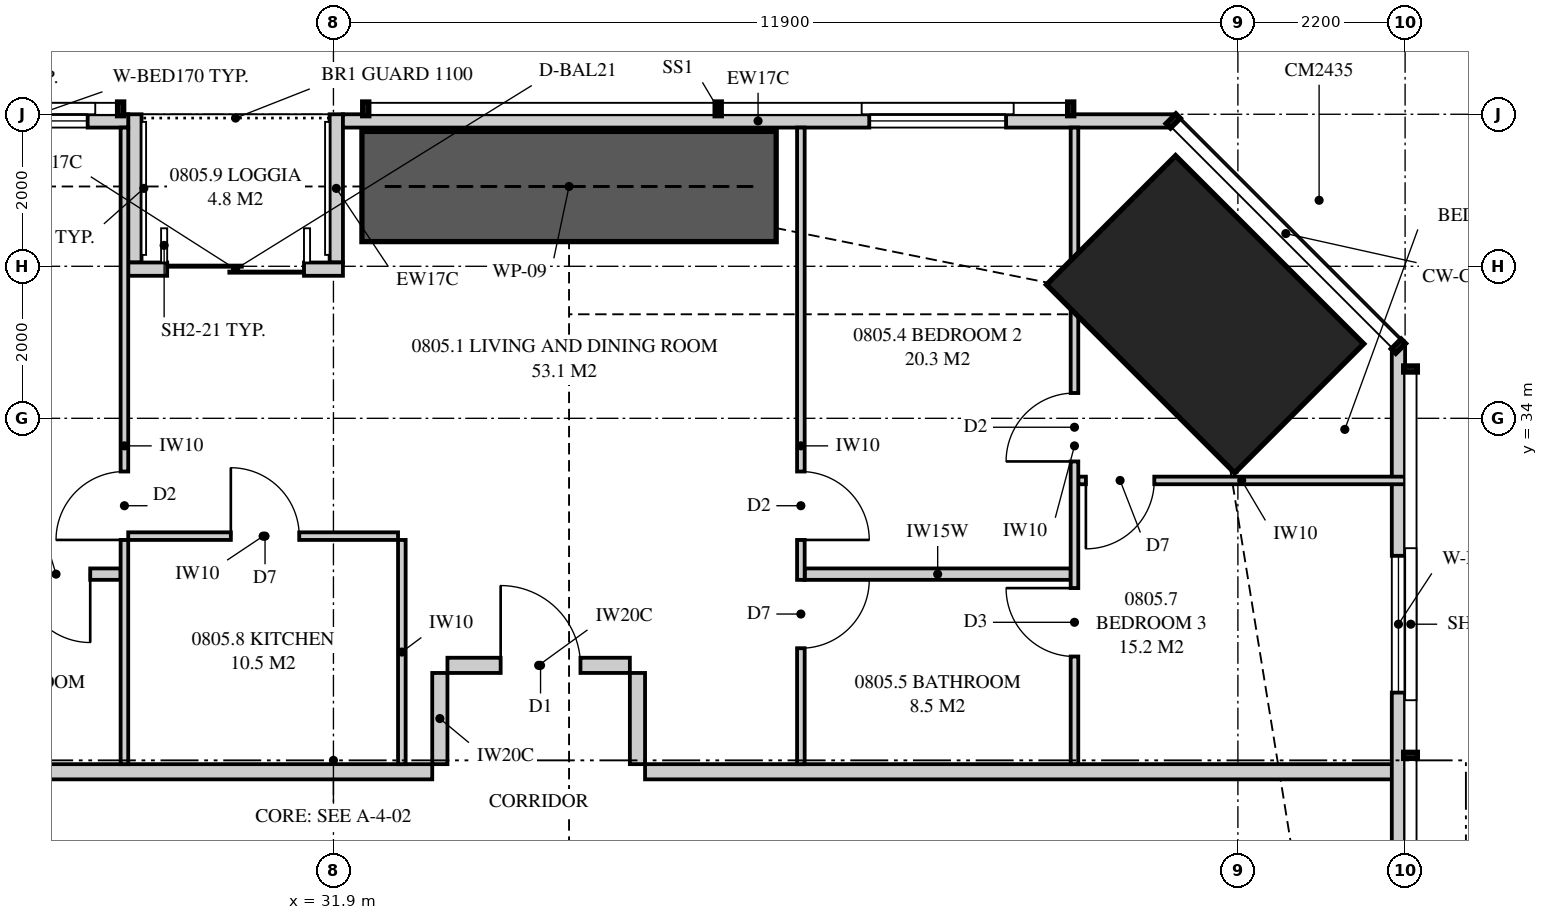
"""IFC4 building model, lengths in metres.
Left out: names, types, materials, properties, quantities, classifications, styles, units other than length and angle.
Written with IfcOpenShell. Run it as: python <this file> out.ifc"""

import sys

from ifc_helpers import new_model, si_unit, direction, frame, frame_2d, origin, origin_2d, place, context, subcontext, project, spatial, polyline, rectangle, outline, extrude, element, fill, save


model = new_model("IFC4")
c1 = context("Model", 3, precision=1e-05, world=origin(), true_north=direction((0.0, 1.0)))
c2 = subcontext(c1, "Body", "Model", "MODEL_VIEW")
j1 = project(units=[si_unit("LENGTHUNIT", "METRE"), si_unit("PLANEANGLEUNIT", "RADIAN")], contexts=[c1])
p1 = place(None, origin())
s1 = spatial("IfcSite", under=j1, at=p1, CompositionType="ELEMENT")
p2 = place(p1, origin())
s2 = spatial("IfcBuilding", under=s1, at=p2, CompositionType="ELEMENT")
p3 = place(p2, frame((0.0, 0.0, 34.4)))
s3 = spatial("IfcBuildingStorey", under=s2, at=p3, CompositionType="ELEMENT", Elevation=34.4)
p4 = place(p3, frame((43.369, 35.369, 0.0), z_axis=(0.0, 0.0, 1.0), x_axis=(-0.707106781187, -0.707106781187, 0.0)))
e1 = element("IfcColumn", 1, at=p4, inside=s3, PredefinedType="COLUMN", context=c2, shape_type="SweptSolid", body=[
    extrude(rectangle(XDim=2.4, YDim=3.5, at=origin_2d()), origin(), (0.0, 0.0, 1.0), 3.35),
])
p5 = place(p3, frame((45.913, 3.051, 0.0), z_axis=(0.0, 0.0, 1.0), x_axis=(0.0, 1.0, 0.0)))
e2 = element("IfcWall", 2, at=p5, inside=s3, PredefinedType="SOLIDWALL", context=c2, shape_type="SweptSolid", body=[
    extrude(outline(polyline([(0.0, 0.0), (31.897, 0.0), (31.897, 3.11), (22.167, 3.11), (22.167, 2.15), (22.074, 2.15), (22.074, 3.11), (21.949, 3.11), (21.949, 2.15), (9.949, 2.15), (9.949, 3.11), (9.823, 3.11), (9.823, 2.15), (9.73, 2.15), (9.73, 3.11), (0.0, 3.11), (0.0, 0.0)])), frame((0.0, 0.087, 0.0), z_axis=(0.0, -1.0, 0.0), x_axis=(1.0, 0.0, 0.0)), (0.0, 0.0, 1.0), 0.175),
])
p6 = place(p5, frame((2.257, 0.0, 0.4)))
e3 = element("IfcOpeningElement", 3, at=p6, cuts=e2, PredefinedType="OPENING", context=c2, shape_type="SweptSolid", body=[
    extrude(rectangle(XDim=1.8, YDim=1.7, at=frame_2d((0.9, 0.85))), frame((0.0, 0.097, 0.0), z_axis=(0.0, -1.0, 0.0), x_axis=(1.0, 0.0, 0.0)), (0.0, 0.0, 1.0), 0.195),
])
p7 = place(p5, frame((14.849, 0.0, 0.4)))
e4 = element("IfcOpeningElement", 4, at=p7, cuts=e2, PredefinedType="OPENING", context=c2, shape_type="SweptSolid", body=[
    extrude(rectangle(XDim=1.2, YDim=1.7, at=frame_2d((0.6, 0.85))), frame((0.0, 0.097, 0.0), z_axis=(0.0, -1.0, 0.0), x_axis=(1.0, 0.0, 0.0)), (0.0, 0.0, 1.0), 0.195),
])
p8 = place(p5, frame((27.34, 0.0, 0.4)))
e5 = element("IfcOpeningElement", 5, at=p8, cuts=e2, PredefinedType="OPENING", context=c2, shape_type="SweptSolid", body=[
    extrude(rectangle(XDim=1.8, YDim=1.7, at=frame_2d((0.9, 0.85))), frame((0.0, 0.097, 0.0), z_axis=(0.0, -1.0, 0.0), x_axis=(1.0, 0.0, 0.0)), (0.0, 0.0, 1.0), 0.195),
])
p9 = place(p3, frame((42.949, 37.913, 0.0), z_axis=(0.0, 0.0, 1.0), x_axis=(-1.0, 0.0, 0.0)))
e6 = element("IfcWall", 6, at=p9, inside=s3, PredefinedType="SOLIDWALL", context=c2, shape_type="SweptSolid", body=[
    extrude(outline(polyline([(0.0, 0.0), (10.924, 0.0), (10.924, 2.15), (7.949, 2.15), (7.949, 3.11), (7.793, 3.11), (7.793, 2.15), (7.745, 2.15), (7.745, 3.11), (0.0, 3.11), (0.0, 0.0)])), frame((0.0, 0.087, 0.0), z_axis=(0.0, -1.0, 0.0), x_axis=(1.0, 0.0, 0.0)), (0.0, 0.0, 1.0), 0.175),
])
p10 = place(p9, frame((2.199, 0.0, 0.4)))
e7 = element("IfcOpeningElement", 7, at=p10, cuts=e6, PredefinedType="OPENING", context=c2, shape_type="SweptSolid", body=[
    extrude(rectangle(XDim=1.8, YDim=1.7, at=frame_2d((0.9, 0.85))), frame((0.0, 0.097, 0.0), z_axis=(0.0, -1.0, 0.0), x_axis=(1.0, 0.0, 0.0)), (0.0, 0.0, 1.0), 0.195),
])
p11 = place(p3, frame((29.2, 37.913, 0.0), z_axis=(0.0, 0.0, 1.0), x_axis=(-1.0, 0.0, 0.0)))
e8 = element("IfcWall", 8, at=p11, inside=s3, PredefinedType="SOLIDWALL", context=c2, shape_type="SweptSolid", body=[
    extrude(rectangle(XDim=8.0, YDim=0.175, at=frame_2d((4.0, 0.0))), origin(), (0.0, 0.0, 1.0), 2.15),
])
p12 = place(p11, frame((0.534, 0.0, 0.4)))
e9 = element("IfcOpeningElement", 9, at=p12, cuts=e8, PredefinedType="OPENING", context=c2, shape_type="SweptSolid", body=[
    extrude(rectangle(XDim=1.8, YDim=1.7, at=frame_2d((0.9, 0.85))), frame((0.0, 0.097, 0.0), z_axis=(0.0, -1.0, 0.0), x_axis=(1.0, 0.0, 0.0)), (0.0, 0.0, 1.0), 0.195),
])
p13 = place(p3, frame((32.025, 35.962, 0.0), z_axis=(0.0, 0.0, 1.0), x_axis=(-1.0, 0.0, 0.0)))
e10 = element("IfcWall", 10, at=p13, inside=s3, PredefinedType="SOLIDWALL", context=c2, shape_type="SweptSolid", body=[
    extrude(rectangle(XDim=2.825, YDim=0.175, at=frame_2d((1.413, 0.0))), origin(), (0.0, 0.0, 1.0), 3.11),
])
p14 = place(p13, frame((0.512, 0.0, 0.0)))
e11 = element("IfcOpeningElement", 11, at=p14, cuts=e10, PredefinedType="OPENING", context=c2, shape_type="SweptSolid", body=[
    extrude(rectangle(XDim=1.8, YDim=2.1, at=frame_2d((0.9, 1.05))), frame((0.0, 0.097, 0.0), z_axis=(0.0, -1.0, 0.0), x_axis=(1.0, 0.0, 0.0)), (0.0, 0.0, 1.0), 0.195),
])
for number, where, z_axis, x_axis in (
    (12, (31.938, 38.0, 0.0), (0.0, 0.0, 1.0), (0.0, -1.0, 0.0)),
    (13, (29.288, 38.0, 0.0), (0.0, 0.0, 1.0), (0.0, -1.0, 0.0)),
):
    element("IfcWall", number, at=place(p3, frame(where, z_axis=z_axis, x_axis=x_axis)), inside=s3, PredefinedType="SOLIDWALL", context=c2, shape_type="SweptSolid", body=[
        extrude(outline(polyline([(0.0, 0.0), (1.95, 0.0), (1.95, 3.11), (1.75, 3.11), (1.75, 2.15), (0.15, 2.15), (0.15, 3.11), (0.0, 3.11), (0.0, 0.0)])), frame((0.0, 0.087, 0.0), z_axis=(0.0, -1.0, 0.0), x_axis=(1.0, 0.0, 0.0)), (0.0, 0.0, 1.0), 0.175),
    ])
p15 = place(p3, frame((23.3, 29.35, 0.0), z_axis=(0.0, 0.0, 1.0), x_axis=(1.0, 0.0, 0.0)))
e14 = element("IfcWall", 14, at=p15, inside=s3, PredefinedType="PARTITIONING", context=c2, shape_type="SweptSolid", body=[
    extrude(outline(polyline([(0.0, 0.0), (9.9, 0.0), (9.9, 3.11), (1.037, 3.11), (1.037, 2.541), (0.363, 2.541), (0.363, 3.11), (0.0, 3.11), (0.0, 0.0)])), frame((0.0, 0.1, 0.0), z_axis=(0.0, -1.0, 0.0), x_axis=(1.0, 0.0, 0.0)), (0.0, 0.0, 1.0), 0.2),
])
p16 = place(p3, frame((29.15, 37.825, 0.0), z_axis=(0.0, 0.0, 1.0), x_axis=(0.0, -1.0, 0.0)))
e15 = element("IfcWall", 15, at=p16, inside=s3, PredefinedType="PARTITIONING", context=c2, shape_type="SweptSolid", body=[
    extrude(outline(polyline([(0.0, 0.0), (8.375, 0.0), (8.375, 3.11), (1.635, 3.11), (1.635, 2.15), (0.0, 2.15), (0.0, 3.11), (0.0, 0.0)])), frame((0.0, 0.05, 0.0), z_axis=(0.0, -1.0, 0.0), x_axis=(1.0, 0.0, 0.0)), (0.0, 0.0, 1.0), 0.1),
])
p17 = place(p16, frame((4.525, 0.0, 0.0)))
e16 = element("IfcOpeningElement", 16, at=p17, cuts=e15, PredefinedType="OPENING", context=c2, shape_type="SweptSolid", body=[
    extrude(rectangle(XDim=0.9, YDim=2.1, at=frame_2d((0.45, 1.05))), frame((0.0, 0.06, 0.0), z_axis=(0.0, -1.0, 0.0), x_axis=(1.0, 0.0, 0.0)), (0.0, 0.0, 1.0), 0.12),
])
p18 = place(p3, frame((38.05, 37.825, 0.0), z_axis=(0.0, 0.0, 1.0), x_axis=(0.0, -1.0, 0.0)))
e17 = element("IfcWall", 17, at=p18, inside=s3, PredefinedType="PARTITIONING", context=c2, shape_type="SweptSolid", body=[
    extrude(outline(polyline([(0.0, 0.0), (8.375, 0.0), (8.375, 3.11), (3.716, 3.11), (3.716, 2.51), (2.265, 2.51), (2.265, 2.15), (0.51, 2.15), (0.51, 3.11), (0.0, 3.11), (0.0, 0.0)])), frame((0.0, 0.05, 0.0), z_axis=(0.0, -1.0, 0.0), x_axis=(1.0, 0.0, 0.0)), (0.0, 0.0, 1.0), 0.1),
])
p19 = place(p18, frame((4.525, 0.0, 0.0)))
e18 = element("IfcOpeningElement", 18, at=p19, cuts=e17, PredefinedType="OPENING", context=c2, shape_type="SweptSolid", body=[
    extrude(rectangle(XDim=0.9, YDim=2.1, at=frame_2d((0.45, 1.05))), frame((0.0, 0.06, 0.0), z_axis=(0.0, -1.0, 0.0), x_axis=(1.0, 0.0, 0.0)), (0.0, 0.0, 1.0), 0.12),
])
p20 = place(p18, frame((5.95, 0.0, 0.0)))
e19 = element("IfcOpeningElement", 19, at=p20, cuts=e17, PredefinedType="OPENING", context=c2, shape_type="SweptSolid", body=[
    extrude(rectangle(XDim=0.9, YDim=2.1, at=frame_2d((0.45, 1.05))), frame((0.0, 0.06, 0.0), z_axis=(0.0, -1.0, 0.0), x_axis=(1.0, 0.0, 0.0)), (0.0, 0.0, 1.0), 0.12),
])
p21 = place(p3, frame((41.65, 37.825, 0.0), z_axis=(0.0, 0.0, 1.0), x_axis=(0.0, -1.0, 0.0)))
e20 = element("IfcWall", 20, at=p21, inside=s3, PredefinedType="PARTITIONING", context=c2, shape_type="SweptSolid", body=[
    extrude(outline(polyline([(0.0, 0.0), (8.375, 0.0), (8.375, 3.11), (3.716, 3.11), (3.716, 2.51), (2.937, 2.51), (2.937, 2.15), (1.285, 2.15), (1.285, 2.51), (1.196, 2.51), (1.196, 3.11), (0.0, 3.11), (0.0, 0.0)])), frame((0.0, 0.05, 0.0), z_axis=(0.0, -1.0, 0.0), x_axis=(1.0, 0.0, 0.0)), (0.0, 0.0, 1.0), 0.1),
])
p22 = place(p21, frame((3.492, 0.0, 0.0)))
e21 = element("IfcOpeningElement", 21, at=p22, cuts=e20, PredefinedType="OPENING", context=c2, shape_type="SweptSolid", body=[
    extrude(rectangle(XDim=0.9, YDim=2.1, at=frame_2d((0.45, 1.05))), frame((0.0, 0.06, 0.0), z_axis=(0.0, -1.0, 0.0), x_axis=(1.0, 0.0, 0.0)), (0.0, 0.0, 1.0), 0.12),
])
p23 = place(p21, frame((6.059, 0.0, 0.0)))
e22 = element("IfcOpeningElement", 22, at=p23, cuts=e20, PredefinedType="OPENING", context=c2, shape_type="SweptSolid", body=[
    extrude(rectangle(XDim=0.9, YDim=2.1, at=frame_2d((0.45, 1.05))), frame((0.0, 0.06, 0.0), z_axis=(0.0, -1.0, 0.0), x_axis=(1.0, 0.0, 0.0)), (0.0, 0.0, 1.0), 0.12),
])
p24 = place(p3, frame((23.3, 31.95, 0.0), z_axis=(0.0, 0.0, 1.0), x_axis=(1.0, 0.0, 0.0)))
e23 = element("IfcWall", 23, at=p24, inside=s3, PredefinedType="PLUMBINGWALL", context=c2, shape_type="SweptSolid", body=[
    extrude(outline(polyline([(0.0, 0.0), (5.8, 0.0), (5.8, 3.11), (1.012, 3.11), (1.012, 2.541), (0.388, 2.541), (0.388, 3.11), (0.0, 3.11), (0.0, 0.0)])), frame((0.0, 0.075, 0.0), z_axis=(0.0, -1.0, 0.0), x_axis=(1.0, 0.0, 0.0)), (0.0, 0.0, 1.0), 0.15),
])
p25 = place(p24, frame((4.5, 0.0, 0.0)))
e24 = element("IfcOpeningElement", 24, at=p25, cuts=e23, PredefinedType="OPENING", context=c2, shape_type="SweptSolid", body=[
    extrude(rectangle(XDim=0.9, YDim=2.1, at=frame_2d((0.45, 1.05))), frame((0.0, 0.085, 0.0), z_axis=(0.0, -1.0, 0.0), x_axis=(1.0, 0.0, 0.0)), (0.0, 0.0, 1.0), 0.17),
])
p26 = place(p3, frame((38.1, 31.95, 0.0), z_axis=(0.0, 0.0, 1.0), x_axis=(1.0, 0.0, 0.0)))
e25 = element("IfcWall", 25, at=p26, inside=s3, PredefinedType="PLUMBINGWALL", context=c2, shape_type="SweptSolid", body=[
    extrude(rectangle(XDim=3.5, YDim=0.15, at=frame_2d((1.75, 0.0))), origin(), (0.0, 0.0, 1.0), 3.11),
])
p27 = place(p3, frame((41.7, 33.183, 0.0), z_axis=(0.0, 0.0, 1.0), x_axis=(1.0, 0.0, 0.0)))
e26 = element("IfcWall", 26, at=p27, inside=s3, PredefinedType="PARTITIONING", context=c2, shape_type="SweptSolid", body=[
    extrude(outline(polyline([(0.0, 0.0), (4.3, 0.0), (4.3, 3.11), (2.894, 3.11), (2.894, 2.15), (1.152, 2.15), (1.152, 3.11), (0.0, 3.11), (0.0, 0.0)])), frame((0.0, 0.05, 0.0), z_axis=(0.0, -1.0, 0.0), x_axis=(1.0, 0.0, 0.0)), (0.0, 0.0, 1.0), 0.1),
])
p28 = place(p27, frame((0.1, 0.0, 0.0)))
e27 = element("IfcOpeningElement", 27, at=p28, cuts=e26, PredefinedType="OPENING", context=c2, shape_type="SweptSolid", body=[
    extrude(rectangle(XDim=0.9, YDim=2.1, at=frame_2d((0.45, 1.05))), frame((0.0, 0.06, 0.0), z_axis=(0.0, -1.0, 0.0), x_axis=(1.0, 0.0, 0.0)), (0.0, 0.0, 1.0), 0.12),
])
p29 = place(p3, frame((29.2, 32.45, 0.0), z_axis=(0.0, 0.0, 1.0), x_axis=(1.0, 0.0, 0.0)))
e28 = element("IfcWall", 28, at=p29, inside=s3, PredefinedType="PARTITIONING", context=c2, shape_type="SweptSolid", body=[
    extrude(rectangle(XDim=3.55, YDim=0.1, at=frame_2d((1.775, 0.0))), origin(), (0.0, 0.0, 1.0), 3.11),
])
p30 = place(p29, frame((1.35, 0.0, 0.0)))
e29 = element("IfcOpeningElement", 29, at=p30, cuts=e28, PredefinedType="OPENING", context=c2, shape_type="SweptSolid", body=[
    extrude(rectangle(XDim=0.9, YDim=2.1, at=frame_2d((0.45, 1.05))), frame((0.0, 0.06, 0.0), z_axis=(0.0, -1.0, 0.0), x_axis=(1.0, 0.0, 0.0)), (0.0, 0.0, 1.0), 0.12),
])
p31 = place(p3, frame((32.8, 32.4, 0.0), z_axis=(0.0, 0.0, 1.0), x_axis=(0.0, -1.0, 0.0)))
e30 = element("IfcWall", 30, at=p31, inside=s3, PredefinedType="PARTITIONING", context=c2, shape_type="SweptSolid", body=[
    extrude(rectangle(XDim=2.95, YDim=0.1, at=frame_2d((1.475, 0.0))), origin(), (0.0, 0.0, 1.0), 3.11),
])
p32 = place(p3, frame((36.0, 29.35, 0.0), z_axis=(0.0, 0.0, 1.0), x_axis=(1.0, 0.0, 0.0)))
e31 = element("IfcWall", 31, at=p32, inside=s3, PredefinedType="PARTITIONING", context=c2, shape_type="SweptSolid", body=[
    extrude(outline(polyline([(0.0, 0.0), (10.0, 0.0), (10.0, 3.11), (9.267, 3.11), (9.267, 2.15), (7.423, 2.15), (7.423, 3.11), (0.0, 3.11), (0.0, 0.0)])), frame((0.0, 0.1, 0.0), z_axis=(0.0, -1.0, 0.0), x_axis=(1.0, 0.0, 0.0)), (0.0, 0.0, 1.0), 0.2),
])
p33 = place(p3, frame((33.4, 30.75, 0.0), z_axis=(0.0, 0.0, 1.0), x_axis=(1.0, 0.0, 0.0)))
e32 = element("IfcWall", 32, at=p33, inside=s3, PredefinedType="PARTITIONING", context=c2, shape_type="SweptSolid", body=[
    extrude(outline(polyline([(0.0, 0.0), (2.4, 0.0), (2.4, 3.11), (1.938, 3.11), (1.938, 2.541), (1.263, 2.541), (1.263, 3.11), (0.0, 3.11), (0.0, 0.0)])), frame((0.0, 0.1, 0.0), z_axis=(0.0, -1.0, 0.0), x_axis=(1.0, 0.0, 0.0)), (0.0, 0.0, 1.0), 0.2),
])
p34 = place(p33, frame((0.7, 0.0, 0.0)))
e33 = element("IfcOpeningElement", 33, at=p34, cuts=e32, PredefinedType="OPENING", context=c2, shape_type="SweptSolid", body=[
    extrude(rectangle(XDim=1.05, YDim=2.2, at=frame_2d((0.525, 1.1))), frame((0.0, 0.11, 0.0), z_axis=(0.0, -1.0, 0.0), x_axis=(1.0, 0.0, 0.0)), (0.0, 0.0, 1.0), 0.22),
])
for number, where, z_axis, x_axis in (
    (34, (33.3, 29.45, 0.0), (0.0, 0.0, 1.0), (0.0, 1.0, 0.0)),
    (35, (35.9, 29.45, 0.0), (0.0, 0.0, 1.0), (0.0, 1.0, 0.0)),
):
    element("IfcWall", number, at=place(p3, frame(where, z_axis=z_axis, x_axis=x_axis)), inside=s3, PredefinedType="PARTITIONING", context=c2, shape_type="SweptSolid", body=[
        extrude(rectangle(XDim=1.2, YDim=0.2, at=frame_2d((0.6, 0.0))), origin(), (0.0, 0.0, 1.0), 3.11),
    ])
p35 = place(p3, frame((32.275, 37.05, 0.0), z_axis=(0.0, 0.0, 1.0), x_axis=(1.0, 0.0, 0.0)))
e36 = element("IfcWall", 36, at=p35, inside=s3, PredefinedType="SHEAR", context=c2, shape_type="SweptSolid", body=[
    extrude(rectangle(XDim=5.45, YDim=1.45, at=frame_2d((2.725, 0.0))), origin(), (0.0, 0.0, 1.0), 3.35),
])
p36 = place(p8, origin())
e37 = element("IfcWindow", 37, at=p36, inside=s3, PartitioningType="SINGLE_PANEL", PredefinedType="WINDOW", context=c2, shape_type="SweptSolid", body=[
    extrude(rectangle(XDim=1.8, YDim=1.7, at=frame_2d((0.9, 0.85))), frame((0.0, 0.03, 0.0), z_axis=(0.0, -1.0, 0.0), x_axis=(1.0, 0.0, 0.0)), (0.0, 0.0, 1.0), 0.06),
])
fill(e5, e37)
p37 = place(p10, origin())
e38 = element("IfcWindow", 38, at=p37, inside=s3, PartitioningType="SINGLE_PANEL", PredefinedType="WINDOW", context=c2, shape_type="SweptSolid", body=[
    extrude(rectangle(XDim=1.8, YDim=1.7, at=frame_2d((0.9, 0.85))), frame((0.0, 0.03, 0.0), z_axis=(0.0, -1.0, 0.0), x_axis=(1.0, 0.0, 0.0)), (0.0, 0.0, 1.0), 0.06),
])
fill(e7, e38)
p38 = place(p14, origin())
e39 = element("IfcDoor", 39, at=p38, inside=s3, OperationType="SLIDING_TO_LEFT", PredefinedType="DOOR", context=c2, shape_type="SweptSolid", body=[
    extrude(rectangle(XDim=1.8, YDim=2.1, at=frame_2d((0.9, 1.05))), frame((0.0, 0.025, 0.0), z_axis=(0.0, -1.0, 0.0), x_axis=(1.0, 0.0, 0.0)), (0.0, 0.0, 1.0), 0.05),
])
fill(e11, e39)
p39 = place(p12, origin())
e40 = element("IfcWindow", 40, at=p39, inside=s3, PartitioningType="SINGLE_PANEL", PredefinedType="WINDOW", context=c2, shape_type="SweptSolid", body=[
    extrude(rectangle(XDim=1.8, YDim=1.7, at=frame_2d((0.9, 0.85))), frame((0.0, 0.03, 0.0), z_axis=(0.0, -1.0, 0.0), x_axis=(1.0, 0.0, 0.0)), (0.0, 0.0, 1.0), 0.06),
])
fill(e9, e40)
p40 = place(p34, origin())
e41 = element("IfcDoor", 41, at=p40, inside=s3, OperationType="SINGLE_SWING_LEFT", PredefinedType="DOOR", context=c2, shape_type="SweptSolid", body=[
    extrude(rectangle(XDim=1.05, YDim=2.2, at=frame_2d((0.525, 1.1))), frame((0.0, 0.025, 0.0), z_axis=(0.0, -1.0, 0.0), x_axis=(1.0, 0.0, 0.0)), (0.0, 0.0, 1.0), 0.05),
])
fill(e33, e41)
p41 = place(p17, frame((0.9, 0.0, 0.0), z_axis=(0.0, 0.0, 1.0), x_axis=(-1.0, 0.0, 0.0)))
e42 = element("IfcDoor", 42, at=p41, inside=s3, OperationType="SINGLE_SWING_LEFT", PredefinedType="DOOR", context=c2, shape_type="SweptSolid", body=[
    extrude(rectangle(XDim=0.9, YDim=2.1, at=frame_2d((0.45, 1.05))), frame((0.0, 0.025, 0.0), z_axis=(0.0, -1.0, 0.0), x_axis=(1.0, 0.0, 0.0)), (0.0, 0.0, 1.0), 0.05),
])
fill(e16, e42)
p42 = place(p25, frame((0.9, 0.0, 0.0), z_axis=(0.0, 0.0, 1.0), x_axis=(-1.0, 0.0, 0.0)))
e43 = element("IfcDoor", 43, at=p42, inside=s3, OperationType="SINGLE_SWING_LEFT", PredefinedType="DOOR", context=c2, shape_type="SweptSolid", body=[
    extrude(rectangle(XDim=0.9, YDim=2.1, at=frame_2d((0.45, 1.05))), frame((0.0, 0.025, 0.0), z_axis=(0.0, -1.0, 0.0), x_axis=(1.0, 0.0, 0.0)), (0.0, 0.0, 1.0), 0.05),
])
fill(e24, e43)
p43 = place(p19, origin())
e44 = element("IfcDoor", 44, at=p43, inside=s3, OperationType="SINGLE_SWING_RIGHT", PredefinedType="DOOR", context=c2, shape_type="SweptSolid", body=[
    extrude(rectangle(XDim=0.9, YDim=2.1, at=frame_2d((0.45, 1.05))), frame((0.0, 0.025, 0.0), z_axis=(0.0, -1.0, 0.0), x_axis=(1.0, 0.0, 0.0)), (0.0, 0.0, 1.0), 0.05),
])
fill(e18, e44)
p44 = place(p20, origin())
e45 = element("IfcDoor", 45, at=p44, inside=s3, OperationType="SINGLE_SWING_LEFT", PredefinedType="DOOR", context=c2, shape_type="SweptSolid", body=[
    extrude(rectangle(XDim=0.9, YDim=2.1, at=frame_2d((0.45, 1.05))), frame((0.0, 0.025, 0.0), z_axis=(0.0, -1.0, 0.0), x_axis=(1.0, 0.0, 0.0)), (0.0, 0.0, 1.0), 0.05),
])
fill(e19, e45)
p45 = place(p28, frame((0.9, 0.0, 0.0), z_axis=(0.0, 0.0, 1.0), x_axis=(-1.0, 0.0, 0.0)))
e46 = element("IfcDoor", 46, at=p45, inside=s3, OperationType="SINGLE_SWING_RIGHT", PredefinedType="DOOR", context=c2, shape_type="SweptSolid", body=[
    extrude(rectangle(XDim=0.9, YDim=2.1, at=frame_2d((0.45, 1.05))), frame((0.0, 0.025, 0.0), z_axis=(0.0, -1.0, 0.0), x_axis=(1.0, 0.0, 0.0)), (0.0, 0.0, 1.0), 0.05),
])
fill(e27, e46)
p46 = place(p22, frame((0.9, 0.0, 0.0), z_axis=(0.0, 0.0, 1.0), x_axis=(-1.0, 0.0, 0.0)))
e47 = element("IfcDoor", 47, at=p46, inside=s3, OperationType="SINGLE_SWING_LEFT", PredefinedType="DOOR", context=c2, shape_type="SweptSolid", body=[
    extrude(rectangle(XDim=0.9, YDim=2.1, at=frame_2d((0.45, 1.05))), frame((0.0, 0.025, 0.0), z_axis=(0.0, -1.0, 0.0), x_axis=(1.0, 0.0, 0.0)), (0.0, 0.0, 1.0), 0.05),
])
fill(e21, e47)
p47 = place(p23, frame((0.9, 0.0, 0.0), z_axis=(0.0, 0.0, 1.0), x_axis=(-1.0, 0.0, 0.0)))
e48 = element("IfcDoor", 48, at=p47, inside=s3, OperationType="SINGLE_SWING_RIGHT", PredefinedType="DOOR", context=c2, shape_type="SweptSolid", body=[
    extrude(rectangle(XDim=0.9, YDim=2.1, at=frame_2d((0.45, 1.05))), frame((0.0, 0.025, 0.0), z_axis=(0.0, -1.0, 0.0), x_axis=(1.0, 0.0, 0.0)), (0.0, 0.0, 1.0), 0.05),
])
fill(e22, e48)
p48 = place(p30, origin())
e49 = element("IfcDoor", 49, at=p48, inside=s3, OperationType="SINGLE_SWING_LEFT", PredefinedType="DOOR", context=c2, shape_type="SweptSolid", body=[
    extrude(rectangle(XDim=0.9, YDim=2.1, at=frame_2d((0.45, 1.05))), frame((0.0, 0.025, 0.0), z_axis=(0.0, -1.0, 0.0), x_axis=(1.0, 0.0, 0.0)), (0.0, 0.0, 1.0), 0.05),
])
fill(e29, e49)
save(model, sys.argv[1])
